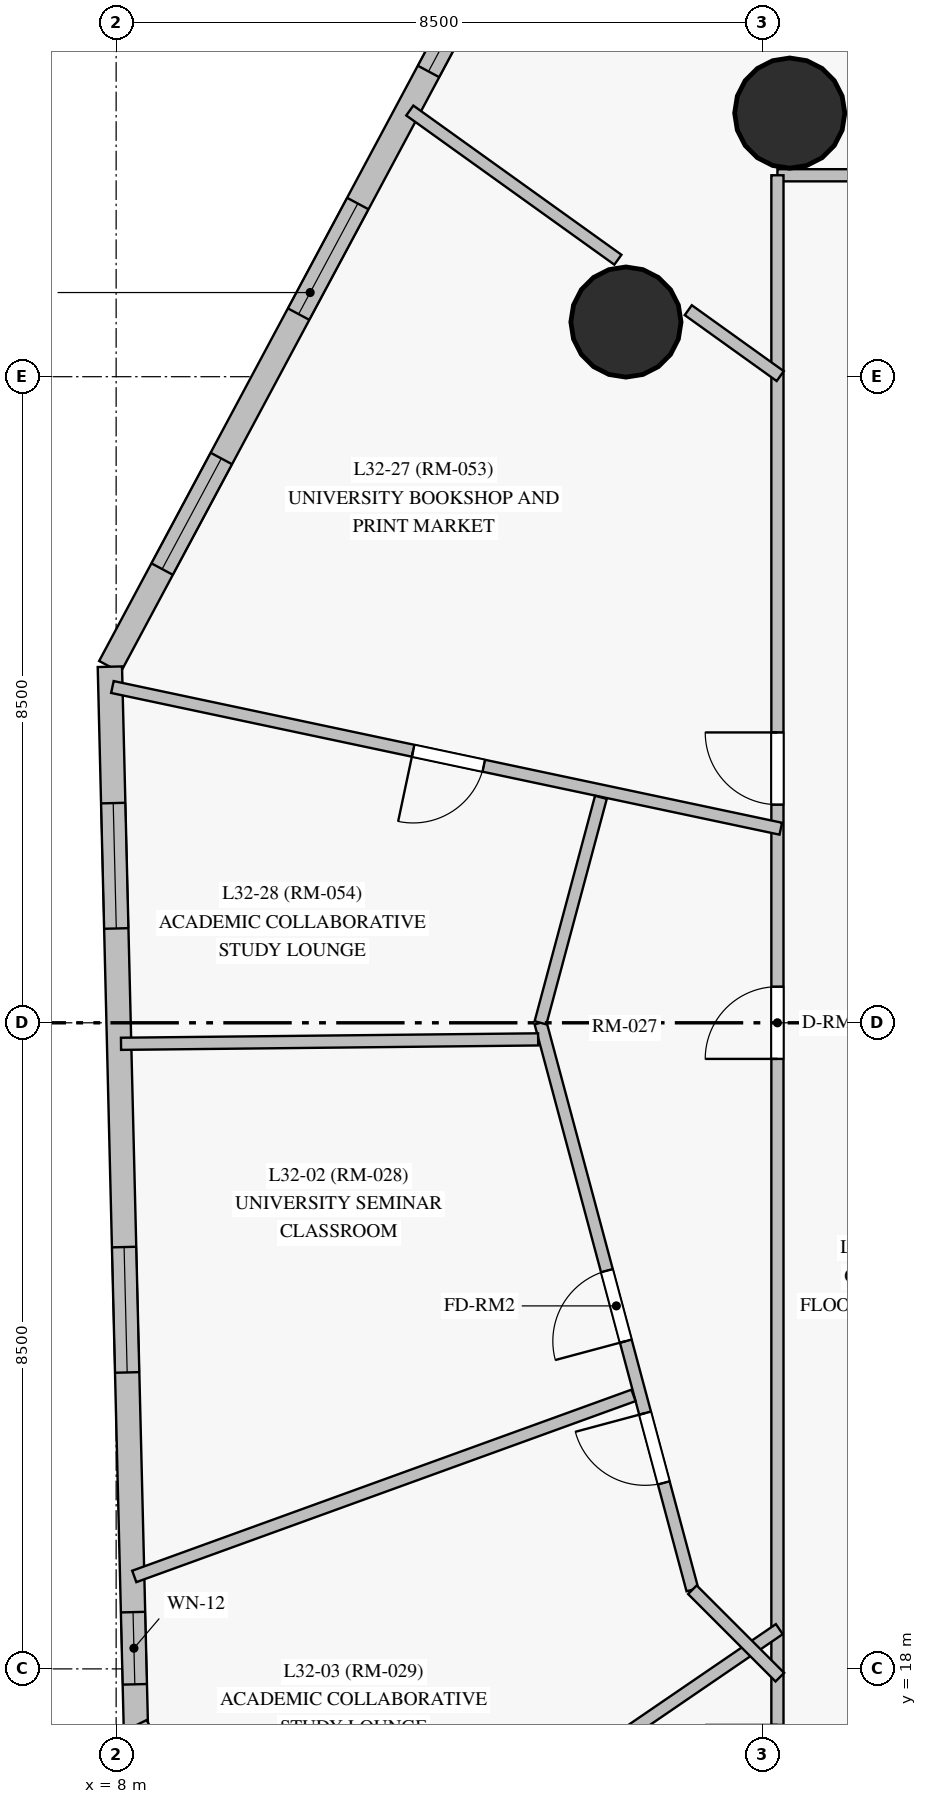
"""IFC4 building model, lengths in metres.
Left out: names, types, materials, properties, quantities, classifications, styles, units other than length and angle.
Written with IfcOpenShell. Run it as: python <this file> out.ifc"""

import sys

from ifc_helpers import new_model, si_unit, direction, frame, frame_2d, origin, origin_with_axes, origin_2d, place, context, subcontext, project, spatial, rectangle, circle, extrude, source, transform, mapped, element, fill, save


model = new_model("IFC4")
c1 = context("Model", 3, precision=1e-05, world=origin(), true_north=direction((0.0, 1.0)))
c2 = subcontext(c1, "Body", "Model", "MODEL_VIEW")
j1 = project(units=[si_unit("LENGTHUNIT", "METRE"), si_unit("PLANEANGLEUNIT", "RADIAN")], contexts=[c1])
p1 = place(None, origin())
s1 = spatial("IfcSite", under=j1, at=p1, CompositionType="ELEMENT")
p2 = place(p1, origin())
s2 = spatial("IfcBuilding", under=s1, at=p2, CompositionType="ELEMENT")
p3 = place(p2, frame((0.0, 0.0, 117.55)))
s3 = spatial("IfcBuildingStorey", under=s2, at=p3, CompositionType="ELEMENT", Elevation=117.55)
m1 = source(origin_with_axes(), c2, "Body", "SweptSolid", [
    extrude(circle(Radius=0.725, at=origin_2d()), origin(), (0.0, 0.0, 1.0), 3.05),
])
for number, where, z_axis, x_axis in (
    (1, (16.862, 38.468, 0.0), (0.0, 0.0, 1.0), (1.0, 0.0, 0.0)),
    (2, (14.707, 35.719, 0.0), (0.0, 0.0, 1.0), (1.0, 0.0, 0.0)),
):
    element("IfcColumn", number, at=place(p3, frame(where, z_axis=z_axis, x_axis=x_axis)), inside=s3, PredefinedType="COLUMN", context=c2, shape_type="MappedRepresentation", body=[
        mapped(m1, transform((0.0, 0.0, 0.0), scale=1.0)),
    ])
p4 = place(p3, frame((13.188, 41.03, 0.0), z_axis=(0.0, 0.0, 1.0), x_axis=(-0.471928958931, -0.881636579165, 0.0)))
e3 = element("IfcWall", 3, at=p4, inside=s3, PredefinedType="SOLIDWALL", context=c2, shape_type="SweptSolid", body=[
    extrude(rectangle(XDim=11.167, YDim=0.32, at=frame_2d((5.583, 0.0))), origin(), (0.0, 0.0, 1.0), 2.825),
])
p5 = place(p4, frame((0.634, 0.0, 0.85)))
e4 = element("IfcOpeningElement", 4, at=p5, cuts=e3, PredefinedType="OPENING", context=c2, shape_type="SweptSolid", body=[
    extrude(rectangle(XDim=1.65, YDim=1.65, at=frame_2d((0.825, 0.825))), frame((0.0, 0.17, 0.0), z_axis=(0.0, -1.0, 0.0), x_axis=(1.0, 0.0, 0.0)), (0.0, 0.0, 1.0), 0.34),
])
p6 = place(p4, frame((4.255, 0.0, 0.85)))
e5 = element("IfcOpeningElement", 5, at=p6, cuts=e3, PredefinedType="OPENING", context=c2, shape_type="SweptSolid", body=[
    extrude(rectangle(XDim=1.65, YDim=1.65, at=frame_2d((0.825, 0.825))), frame((0.0, 0.17, 0.0), z_axis=(0.0, -1.0, 0.0), x_axis=(1.0, 0.0, 0.0)), (0.0, 0.0, 1.0), 0.34),
])
p7 = place(p4, frame((8.06, 0.0, 0.85)))
e6 = element("IfcOpeningElement", 6, at=p7, cuts=e3, PredefinedType="OPENING", context=c2, shape_type="SweptSolid", body=[
    extrude(rectangle(XDim=1.65, YDim=1.65, at=frame_2d((0.825, 0.825))), frame((0.0, 0.17, 0.0), z_axis=(0.0, -1.0, 0.0), x_axis=(1.0, 0.0, 0.0)), (0.0, 0.0, 1.0), 0.34),
])
p8 = place(p3, frame((7.917, 31.185, 0.0), z_axis=(0.0, 0.0, 1.0), x_axis=(0.024498324563, -0.999699871008, 0.0)))
e7 = element("IfcWall", 7, at=p8, inside=s3, PredefinedType="SOLIDWALL", context=c2, shape_type="SweptSolid", body=[
    extrude(rectangle(XDim=13.932, YDim=0.32, at=frame_2d((6.966, 0.0))), origin(), (0.0, 0.0, 1.0), 2.825),
])
p9 = place(p8, frame((1.795, 0.0, 0.85)))
e8 = element("IfcOpeningElement", 8, at=p9, cuts=e7, PredefinedType="OPENING", context=c2, shape_type="SweptSolid", body=[
    extrude(rectangle(XDim=1.65, YDim=1.65, at=frame_2d((0.825, 0.825))), frame((0.0, 0.17, 0.0), z_axis=(0.0, -1.0, 0.0), x_axis=(1.0, 0.0, 0.0)), (0.0, 0.0, 1.0), 0.34),
])
p10 = place(p8, frame((7.637, 0.0, 0.85)))
e9 = element("IfcOpeningElement", 9, at=p10, cuts=e7, PredefinedType="OPENING", context=c2, shape_type="SweptSolid", body=[
    extrude(rectangle(XDim=1.65, YDim=1.65, at=frame_2d((0.825, 0.825))), frame((0.0, 0.17, 0.0), z_axis=(0.0, -1.0, 0.0), x_axis=(1.0, 0.0, 0.0)), (0.0, 0.0, 1.0), 0.34),
])
p11 = place(p8, frame((12.442, 0.0, 0.85)))
e10 = element("IfcOpeningElement", 10, at=p11, cuts=e7, PredefinedType="OPENING", context=c2, shape_type="SweptSolid", body=[
    extrude(rectangle(XDim=0.95, YDim=1.5, at=frame_2d((0.475, 0.75))), frame((0.0, 0.17, 0.0), z_axis=(0.0, -1.0, 0.0), x_axis=(1.0, 0.0, 0.0)), (0.0, 0.0, 1.0), 0.34),
])
p12 = place(p3, frame((8.259, 17.257, 0.0), z_axis=(0.0, 0.0, 1.0), x_axis=(0.443120840908, -0.896461890073, 0.0)))
e11 = element("IfcWall", 11, at=p12, inside=s3, PredefinedType="SOLIDWALL", context=c2, shape_type="SweptSolid", body=[
    extrude(rectangle(XDim=9.627, YDim=0.32, at=frame_2d((4.813, 0.0))), origin(), (0.0, 0.0, 1.0), 2.825),
])
p13 = place(p12, frame((1.085, 0.0, 0.85)))
e12 = element("IfcOpeningElement", 12, at=p13, cuts=e11, PredefinedType="OPENING", context=c2, shape_type="SweptSolid", body=[
    extrude(rectangle(XDim=1.65, YDim=1.65, at=frame_2d((0.825, 0.825))), frame((0.0, 0.17, 0.0), z_axis=(0.0, -1.0, 0.0), x_axis=(1.0, 0.0, 0.0)), (0.0, 0.0, 1.0), 0.34),
])
p14 = place(p12, frame((5.557, 0.0, 0.85)))
e13 = element("IfcOpeningElement", 13, at=p14, cuts=e11, PredefinedType="OPENING", context=c2, shape_type="SweptSolid", body=[
    extrude(rectangle(XDim=1.65, YDim=1.65, at=frame_2d((0.825, 0.825))), frame((0.0, 0.17, 0.0), z_axis=(0.0, -1.0, 0.0), x_axis=(1.0, 0.0, 0.0)), (0.0, 0.0, 1.0), 0.34),
])
p15 = place(p3, frame((16.7, 37.65, 0.0), z_axis=(0.0, 0.0, 1.0), x_axis=(1.0, 0.0, 0.0)))
e14 = element("IfcWall", 14, at=p15, inside=s3, PredefinedType="PARTITIONING", context=c2, shape_type="SweptSolid", body=[
    extrude(rectangle(XDim=23.5, YDim=0.16, at=frame_2d((11.75, 0.0))), origin(), (0.0, 0.0, 1.0), 2.325),
])
p16 = place(p15, frame((20.526, 0.0, 0.0)))
e15 = element("IfcOpeningElement", 15, at=p16, cuts=e14, PredefinedType="OPENING", context=c2, shape_type="SweptSolid", body=[
    extrude(rectangle(XDim=0.95, YDim=2.15, at=frame_2d((0.475, 1.075))), frame((0.0, 0.09, 0.0), z_axis=(0.0, -1.0, 0.0), x_axis=(1.0, 0.0, 0.0)), (0.0, 0.0, 1.0), 0.18),
])
p17 = place(p15, frame((17.997, 0.0, 0.0)))
e16 = element("IfcOpeningElement", 16, at=p17, cuts=e14, PredefinedType="OPENING", context=c2, shape_type="SweptSolid", body=[
    extrude(rectangle(XDim=0.95, YDim=2.15, at=frame_2d((0.475, 1.075))), frame((0.0, 0.09, 0.0), z_axis=(0.0, -1.0, 0.0), x_axis=(1.0, 0.0, 0.0)), (0.0, 0.0, 1.0), 0.18),
])
p18 = place(p15, frame((14.26, 0.0, 0.0)))
e17 = element("IfcOpeningElement", 17, at=p18, cuts=e14, PredefinedType="OPENING", context=c2, shape_type="SweptSolid", body=[
    extrude(rectangle(XDim=0.95, YDim=2.15, at=frame_2d((0.475, 1.075))), frame((0.0, 0.09, 0.0), z_axis=(0.0, -1.0, 0.0), x_axis=(1.0, 0.0, 0.0)), (0.0, 0.0, 1.0), 0.18),
])
p19 = place(p15, frame((13.256, 0.0, 0.0)))
e18 = element("IfcOpeningElement", 18, at=p19, cuts=e14, PredefinedType="OPENING", context=c2, shape_type="SweptSolid", body=[
    extrude(rectangle(XDim=0.86, YDim=2.1, at=frame_2d((0.43, 1.05))), frame((0.0, 0.09, 0.0), z_axis=(0.0, -1.0, 0.0), x_axis=(1.0, 0.0, 0.0)), (0.0, 0.0, 1.0), 0.18),
])
p20 = place(p15, frame((11.56, 0.0, 0.0)))
e19 = element("IfcOpeningElement", 19, at=p20, cuts=e14, PredefinedType="OPENING", context=c2, shape_type="SweptSolid", body=[
    extrude(rectangle(XDim=0.95, YDim=2.15, at=frame_2d((0.475, 1.075))), frame((0.0, 0.09, 0.0), z_axis=(0.0, -1.0, 0.0), x_axis=(1.0, 0.0, 0.0)), (0.0, 0.0, 1.0), 0.18),
])
p21 = place(p15, frame((9.635, 0.0, 0.0)))
e20 = element("IfcOpeningElement", 20, at=p21, cuts=e14, PredefinedType="OPENING", context=c2, shape_type="SweptSolid", body=[
    extrude(rectangle(XDim=0.95, YDim=2.15, at=frame_2d((0.475, 1.075))), frame((0.0, 0.09, 0.0), z_axis=(0.0, -1.0, 0.0), x_axis=(1.0, 0.0, 0.0)), (0.0, 0.0, 1.0), 0.18),
])
p22 = place(p15, frame((7.922, 0.0, 0.0)))
e21 = element("IfcOpeningElement", 21, at=p22, cuts=e14, PredefinedType="OPENING", context=c2, shape_type="SweptSolid", body=[
    extrude(rectangle(XDim=0.95, YDim=2.15, at=frame_2d((0.475, 1.075))), frame((0.0, 0.09, 0.0), z_axis=(0.0, -1.0, 0.0), x_axis=(1.0, 0.0, 0.0)), (0.0, 0.0, 1.0), 0.18),
])
p23 = place(p15, frame((6.81, 0.0, 0.0)))
e22 = element("IfcOpeningElement", 22, at=p23, cuts=e14, PredefinedType="OPENING", context=c2, shape_type="SweptSolid", body=[
    extrude(rectangle(XDim=0.95, YDim=2.15, at=frame_2d((0.475, 1.075))), frame((0.0, 0.09, 0.0), z_axis=(0.0, -1.0, 0.0), x_axis=(1.0, 0.0, 0.0)), (0.0, 0.0, 1.0), 0.18),
])
p24 = place(p15, frame((2.856, 0.0, 0.0)))
e23 = element("IfcOpeningElement", 23, at=p24, cuts=e14, PredefinedType="OPENING", context=c2, shape_type="SweptSolid", body=[
    extrude(rectangle(XDim=0.95, YDim=2.15, at=frame_2d((0.475, 1.075))), frame((0.0, 0.09, 0.0), z_axis=(0.0, -1.0, 0.0), x_axis=(1.0, 0.0, 0.0)), (0.0, 0.0, 1.0), 0.18),
])
p25 = place(p3, frame((16.7, 15.35, 0.0), z_axis=(0.0, 0.0, 1.0), x_axis=(0.0, 1.0, 0.0)))
e24 = element("IfcWall", 24, at=p25, inside=s3, PredefinedType="PARTITIONING", context=c2, shape_type="SweptSolid", body=[
    extrude(rectangle(XDim=22.3, YDim=0.16, at=frame_2d((11.15, 0.0))), origin(), (0.0, 0.0, 1.0), 2.225),
])
p26 = place(p25, frame((10.675, 0.0, 0.0)))
e25 = element("IfcOpeningElement", 25, at=p26, cuts=e24, PredefinedType="OPENING", context=c2, shape_type="SweptSolid", body=[
    extrude(rectangle(XDim=0.95, YDim=2.15, at=frame_2d((0.475, 1.075))), frame((0.0, 0.09, 0.0), z_axis=(0.0, -1.0, 0.0), x_axis=(1.0, 0.0, 0.0)), (0.0, 0.0, 1.0), 0.18),
])
p27 = place(p25, frame((0.963, 0.0, 0.0)))
e26 = element("IfcOpeningElement", 26, at=p27, cuts=e24, PredefinedType="OPENING", context=c2, shape_type="SweptSolid", body=[
    extrude(rectangle(XDim=0.95, YDim=2.15, at=frame_2d((0.475, 1.075))), frame((0.0, 0.09, 0.0), z_axis=(0.0, -1.0, 0.0), x_axis=(1.0, 0.0, 0.0)), (0.0, 0.0, 1.0), 0.18),
])
p28 = place(p25, frame((14.02, 0.0, 0.0)))
e27 = element("IfcOpeningElement", 27, at=p28, cuts=e24, PredefinedType="OPENING", context=c2, shape_type="SweptSolid", body=[
    extrude(rectangle(XDim=0.95, YDim=2.15, at=frame_2d((0.475, 1.075))), frame((0.0, 0.09, 0.0), z_axis=(0.0, -1.0, 0.0), x_axis=(1.0, 0.0, 0.0)), (0.0, 0.0, 1.0), 0.18),
])
p29 = place(p3, frame((16.744, 29.053, 0.0), z_axis=(0.0, 0.0, 1.0), x_axis=(-0.978261516353, 0.20737503616, 0.0)))
e28 = element("IfcWall", 28, at=p29, inside=s3, PredefinedType="PARTITIONING", context=c2, shape_type="SweptSolid", body=[
    extrude(rectangle(XDim=8.989, YDim=0.16, at=frame_2d((4.494, 0.0))), origin(), (0.0, 0.0, 1.0), 2.825),
])
p30 = place(p29, frame((3.994, 0.0, 0.0)))
e29 = element("IfcOpeningElement", 29, at=p30, cuts=e28, PredefinedType="OPENING", context=c2, shape_type="SweptSolid", body=[
    extrude(rectangle(XDim=0.95, YDim=2.15, at=frame_2d((0.475, 1.075))), frame((0.0, 0.09, 0.0), z_axis=(0.0, -1.0, 0.0), x_axis=(1.0, 0.0, 0.0)), (0.0, 0.0, 1.0), 0.18),
])
p31 = place(p3, frame((15.581, 19.042, 0.0), z_axis=(0.0, 0.0, 1.0), x_axis=(-0.258823534126, 0.965924623448, 0.0)))
e30 = element("IfcWall", 30, at=p31, inside=s3, PredefinedType="PARTITIONING", context=c2, shape_type="SweptSolid", body=[
    extrude(rectangle(XDim=7.722, YDim=0.16, at=frame_2d((3.861, 0.0))), origin(), (0.0, 0.0, 1.0), 2.225),
])
p32 = place(p31, frame((3.386, 0.0, 0.0)))
e31 = element("IfcOpeningElement", 31, at=p32, cuts=e30, PredefinedType="OPENING", context=c2, shape_type="SweptSolid", body=[
    extrude(rectangle(XDim=0.96, YDim=2.15, at=frame_2d((0.48, 1.075))), frame((0.0, 0.09, 0.0), z_axis=(0.0, -1.0, 0.0), x_axis=(1.0, 0.0, 0.0)), (0.0, 0.0, 1.0), 0.18),
])
p33 = place(p31, frame((1.455, 0.0, 0.0)))
e32 = element("IfcOpeningElement", 32, at=p33, cuts=e30, PredefinedType="OPENING", context=c2, shape_type="SweptSolid", body=[
    extrude(rectangle(XDim=0.95, YDim=2.15, at=frame_2d((0.475, 1.075))), frame((0.0, 0.09, 0.0), z_axis=(0.0, -1.0, 0.0), x_axis=(1.0, 0.0, 0.0)), (0.0, 0.0, 1.0), 0.18),
])
p34 = place(p3, frame((14.806, 21.598, 0.0), z_axis=(0.0, 0.0, 1.0), x_axis=(-0.940102191291, -0.340892754295, 0.0)))
e33 = element("IfcWall", 33, at=p34, inside=s3, PredefinedType="PARTITIONING", context=c2, shape_type="SweptSolid", body=[
    extrude(rectangle(XDim=6.986, YDim=0.16, at=frame_2d((3.493, 0.0))), origin(), (0.0, 0.0, 1.0), 2.825),
])
p35 = place(p3, frame((16.725, 18.523, 0.0), z_axis=(0.0, 0.0, 1.0), x_axis=(-0.825538633176, -0.564345607881, 0.0)))
e34 = element("IfcWall", 34, at=p35, inside=s3, PredefinedType="PARTITIONING", context=c2, shape_type="SweptSolid", body=[
    extrude(rectangle(XDim=5.848, YDim=0.16, at=frame_2d((2.924, 0.0))), origin(), (0.0, 0.0, 1.0), 2.825),
])
p36 = place(p3, frame((8.064, 26.224, 0.0), z_axis=(0.0, 0.0, 1.0), x_axis=(0.999943950458, 0.010587537157, 0.0)))
e35 = element("IfcWall", 35, at=p36, inside=s3, PredefinedType="PARTITIONING", context=c2, shape_type="SweptSolid", body=[
    extrude(rectangle(XDim=5.488, YDim=0.16, at=frame_2d((2.744, 0.0))), origin(), (0.0, 0.0, 1.0), 2.825),
])
p37 = place(p3, frame((14.601, 36.539, 0.0), z_axis=(0.0, 0.0, 1.0), x_axis=(-0.812679267744, 0.582711255923, 0.0)))
e36 = element("IfcWall", 36, at=p37, inside=s3, PredefinedType="PARTITIONING", context=c2, shape_type="SweptSolid", body=[
    extrude(rectangle(XDim=3.369, YDim=0.16, at=frame_2d((1.684, 0.0))), origin(), (0.0, 0.0, 1.0), 2.825),
])
p38 = place(p3, frame((13.583, 26.5, 0.0), z_axis=(0.0, 0.0, 1.0), x_axis=(0.258849998641, 0.965917531782, 0.0)))
e37 = element("IfcWall", 37, at=p38, inside=s3, PredefinedType="PARTITIONING", context=c2, shape_type="SweptSolid", body=[
    extrude(rectangle(XDim=3.071, YDim=0.16, at=frame_2d((1.536, 0.0))), origin(), (0.0, 0.0, 1.0), 2.225),
])
p39 = place(p3, frame((16.732, 17.891, 0.0), z_axis=(0.0, 0.0, 1.0), x_axis=(-0.707031752615, 0.707181801798, 0.0)))
e38 = element("IfcWall", 38, at=p39, inside=s3, PredefinedType="PARTITIONING", context=c2, shape_type="SweptSolid", body=[
    extrude(rectangle(XDim=1.627, YDim=0.16, at=frame_2d((0.813, 0.0))), origin(), (0.0, 0.0, 1.0), 2.825),
])
p40 = place(p3, frame((16.737, 35.008, 0.0), z_axis=(0.0, 0.0, 1.0), x_axis=(-0.812690241853, 0.582695950558, 0.0)))
e39 = element("IfcWall", 39, at=p40, inside=s3, PredefinedType="PARTITIONING", context=c2, shape_type="SweptSolid", body=[
    extrude(rectangle(XDim=1.488, YDim=0.16, at=frame_2d((0.744, 0.0))), origin(), (0.0, 0.0, 1.0), 2.225),
])
m2 = source(origin_with_axes(), c2, "Body", "SweptSolid", [
    extrude(rectangle(XDim=1.65, YDim=1.65, at=frame_2d((0.825, 0.825))), frame((0.0, 0.03, 0.0), z_axis=(0.0, -1.0, 0.0), x_axis=(1.0, 0.0, 0.0)), (0.0, 0.0, 1.0), 0.06),
])
p41 = place(p5, origin())
e40 = element("IfcWindow", 40, at=p41, inside=s3, PartitioningType="SINGLE_PANEL", PredefinedType="WINDOW", context=c2, shape_type="MappedRepresentation", body=[
    mapped(m2, transform((0.0, 0.0, 0.0), scale=1.0)),
])
fill(e4, e40)
p42 = place(p6, origin())
e41 = element("IfcWindow", 41, at=p42, inside=s3, PartitioningType="SINGLE_PANEL", PredefinedType="WINDOW", context=c2, shape_type="MappedRepresentation", body=[
    mapped(m2, transform((0.0, 0.0, 0.0), scale=1.0)),
])
fill(e5, e41)
p43 = place(p7, origin())
e42 = element("IfcWindow", 42, at=p43, inside=s3, PartitioningType="SINGLE_PANEL", PredefinedType="WINDOW", context=c2, shape_type="MappedRepresentation", body=[
    mapped(m2, transform((0.0, 0.0, 0.0), scale=1.0)),
])
fill(e6, e42)
p44 = place(p9, origin())
e43 = element("IfcWindow", 43, at=p44, inside=s3, PartitioningType="SINGLE_PANEL", PredefinedType="WINDOW", context=c2, shape_type="MappedRepresentation", body=[
    mapped(m2, transform((0.0, 0.0, 0.0), scale=1.0)),
])
fill(e8, e43)
p45 = place(p10, origin())
e44 = element("IfcWindow", 44, at=p45, inside=s3, PartitioningType="SINGLE_PANEL", PredefinedType="WINDOW", context=c2, shape_type="MappedRepresentation", body=[
    mapped(m2, transform((0.0, 0.0, 0.0), scale=1.0)),
])
fill(e9, e44)
m3 = source(origin_with_axes(), c2, "Body", "SweptSolid", [
    extrude(rectangle(XDim=0.95, YDim=1.5, at=frame_2d((0.475, 0.75))), frame((0.0, 0.03, 0.0), z_axis=(0.0, -1.0, 0.0), x_axis=(1.0, 0.0, 0.0)), (0.0, 0.0, 1.0), 0.06),
])
p46 = place(p11, origin())
e45 = element("IfcWindow", 45, at=p46, inside=s3, PartitioningType="SINGLE_PANEL", PredefinedType="WINDOW", context=c2, shape_type="MappedRepresentation", body=[
    mapped(m3, transform((0.0, 0.0, 0.0), scale=1.0)),
])
fill(e10, e45)
m4 = source(origin_with_axes(), c2, "Body", "SweptSolid", [
    extrude(rectangle(XDim=0.95, YDim=2.15, at=frame_2d((0.475, 1.075))), frame((0.0, 0.025, 0.0), z_axis=(0.0, -1.0, 0.0), x_axis=(1.0, 0.0, 0.0)), (0.0, 0.0, 1.0), 0.05),
])
p47 = place(p26, origin())
e46 = element("IfcDoor", 46, at=p47, inside=s3, OperationType="SINGLE_SWING_LEFT", PredefinedType="DOOR", context=c2, shape_type="MappedRepresentation", body=[
    mapped(m4, transform((0.0, 0.0, 0.0), scale=1.0)),
])
fill(e25, e46)
p48 = place(p28, origin())
e47 = element("IfcDoor", 47, at=p48, inside=s3, OperationType="SINGLE_SWING_RIGHT", PredefinedType="DOOR", context=c2, shape_type="MappedRepresentation", body=[
    mapped(m4, transform((0.0, 0.0, 0.0), scale=1.0)),
])
fill(e27, e47)
m5 = source(origin_with_axes(), c2, "Body", "SweptSolid", [
    extrude(rectangle(XDim=0.96, YDim=2.15, at=frame_2d((0.48, 1.075))), frame((0.0, 0.025, 0.0), z_axis=(0.0, -1.0, 0.0), x_axis=(1.0, 0.0, 0.0)), (0.0, 0.0, 1.0), 0.05),
])
p49 = place(p32, origin())
e48 = element("IfcDoor", 48, at=p49, inside=s3, OperationType="SINGLE_SWING_LEFT", PredefinedType="DOOR", context=c2, shape_type="MappedRepresentation", body=[
    mapped(m5, transform((0.0, 0.0, 0.0), scale=1.0)),
])
fill(e31, e48)
p50 = place(p33, origin())
e49 = element("IfcDoor", 49, at=p50, inside=s3, OperationType="SINGLE_SWING_RIGHT", PredefinedType="DOOR", context=c2, shape_type="MappedRepresentation", body=[
    mapped(m4, transform((0.0, 0.0, 0.0), scale=1.0)),
])
fill(e32, e49)
p51 = place(p30, origin())
e50 = element("IfcDoor", 50, at=p51, inside=s3, OperationType="SINGLE_SWING_RIGHT", PredefinedType="DOOR", context=c2, shape_type="MappedRepresentation", body=[
    mapped(m4, transform((0.0, 0.0, 0.0), scale=1.0)),
])
fill(e29, e50)
save(model, sys.argv[1])
